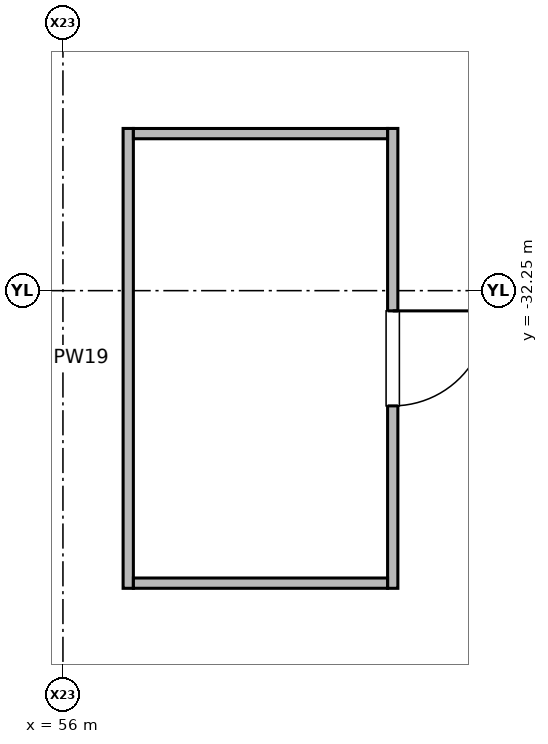
"""IFC4 building model, lengths in metres.
Left out: names, types, materials, properties, quantities, classifications, styles, units other than length and angle.
Written with IfcOpenShell. Run it as: python <this file> out.ifc"""

import sys

from ifc_helpers import new_model, si_unit, direction, frame, frame_2d, origin, place, context, subcontext, project, spatial, rectangle, extrude, element, fill, save


model = new_model("IFC4")
c1 = context("Model", 3, precision=1e-05, world=origin(), true_north=direction((0.0, 1.0)))
c2 = subcontext(c1, "Body", "Model", "MODEL_VIEW")
j1 = project(units=[si_unit("LENGTHUNIT", "METRE"), si_unit("PLANEANGLEUNIT", "RADIAN")], contexts=[c1])
p1 = place(None, origin())
s1 = spatial("IfcSite", under=j1, at=p1, CompositionType="ELEMENT")
p2 = place(p1, origin())
s2 = spatial("IfcBuilding", under=s1, at=p2, CompositionType="ELEMENT")
p3 = place(p2, origin())
s3 = spatial("IfcBuildingStorey", under=s2, at=p3, CompositionType="ELEMENT", Elevation=0.0)
p4 = place(p3, frame((60.339, -30.116, 0.0), z_axis=(0.0, 0.0, 1.0), x_axis=(0.0, -1.0, 0.0)))
e1 = element("IfcWall", 1, at=p4, inside=s3, PredefinedType="PARTITIONING", context=c2, shape_type="SweptSolid", body=[
    extrude(rectangle(XDim=6.05, YDim=0.135, at=frame_2d((3.025, 0.0))), origin(), (0.0, 0.0, 1.0), 5.02),
])
p5 = place(p4, frame((2.4, 0.0, 0.0)))
e2 = element("IfcOpeningElement", 2, at=p5, cuts=e1, PredefinedType="OPENING", context=c2, shape_type="SweptSolid", body=[
    extrude(rectangle(XDim=1.25, YDim=2.2, at=frame_2d((0.625, 1.1))), frame((0.0, 0.077, 0.0), z_axis=(0.0, -1.0, 0.0), x_axis=(1.0, 0.0, 0.0)), (0.0, 0.0, 1.0), 0.155),
])
p6 = place(p3, frame((56.859, -36.166, 0.0), z_axis=(0.0, 0.0, 1.0), x_axis=(0.0, 1.0, 0.0)))
e3 = element("IfcWall", 3, at=p6, inside=s3, PredefinedType="PARTITIONING", context=c2, shape_type="SweptSolid", body=[
    extrude(rectangle(XDim=6.05, YDim=0.135, at=frame_2d((3.025, 0.0))), origin(), (0.0, 0.0, 1.0), 5.02),
])
for number, where, z_axis, x_axis in (
    (4, (56.927, -36.098, 0.0), (0.0, 0.0, 1.0), (1.0, 0.0, 0.0)),
    (5, (56.927, -30.184, 0.0), (0.0, 0.0, 1.0), (1.0, 0.0, 0.0)),
):
    element("IfcWall", number, at=place(p3, frame(where, z_axis=z_axis, x_axis=x_axis)), inside=s3, PredefinedType="PARTITIONING", context=c2, shape_type="SweptSolid", body=[
        extrude(rectangle(XDim=3.344, YDim=0.135, at=frame_2d((1.672, 0.0))), origin(), (0.0, 0.0, 1.0), 5.02),
    ])
p7 = place(p5, origin())
e6 = element("IfcDoor", 6, at=p7, inside=s3, OperationType="SINGLE_SWING_LEFT", PredefinedType="DOOR", context=c2, shape_type="SweptSolid", body=[
    extrude(rectangle(XDim=1.25, YDim=2.2, at=frame_2d((0.625, 1.1))), frame((0.0, 0.025, 0.0), z_axis=(0.0, -1.0, 0.0), x_axis=(1.0, 0.0, 0.0)), (0.0, 0.0, 1.0), 0.05),
])
fill(e2, e6)
save(model, sys.argv[1])
